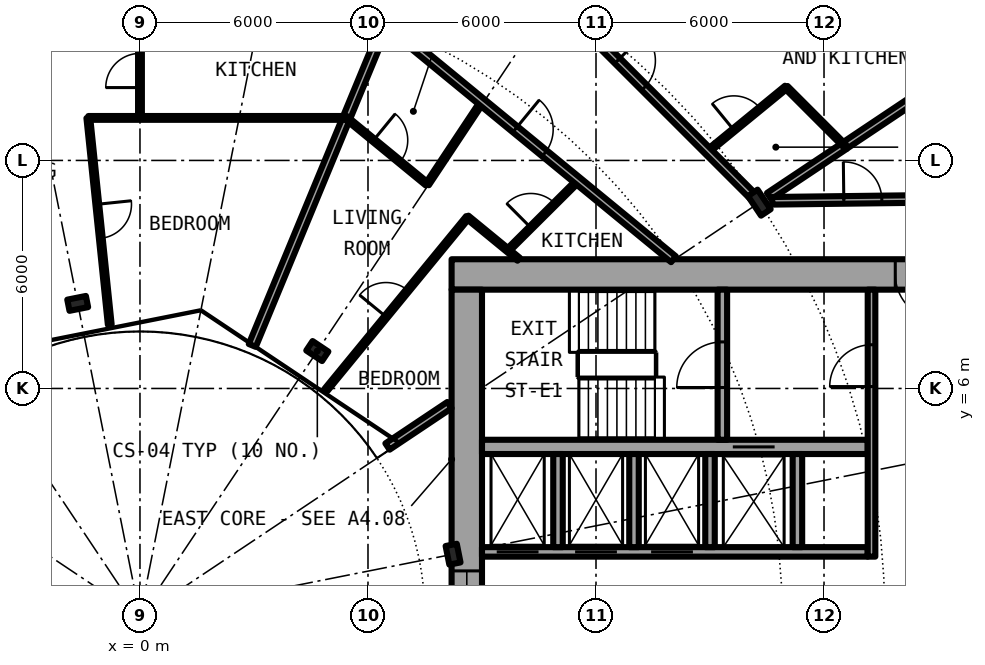
"""IFC4 building model, lengths in metres.
Left out: names, types, materials, properties, quantities, classifications, styles, units other than length and angle.
Written with IfcOpenShell. Run it as: python <this file> out.ifc"""

import sys

from ifc_helpers import new_model, si_unit, direction, frame, frame_2d, origin, origin_2d, place, context, subcontext, project, spatial, rectangle, i_section, extrude, element, fill, save


model = new_model("IFC4")
c1 = context("Model", 3, precision=1e-05, world=origin(), true_north=direction((0.0, 1.0)))
c2 = subcontext(c1, "Body", "Model", "MODEL_VIEW")
j1 = project(units=[si_unit("LENGTHUNIT", "METRE"), si_unit("PLANEANGLEUNIT", "RADIAN")], contexts=[c1])
p1 = place(None, origin())
s1 = spatial("IfcSite", under=j1, at=p1, CompositionType="ELEMENT")
p2 = place(p1, origin())
s2 = spatial("IfcBuilding", under=s1, at=p2, CompositionType="ELEMENT")
p3 = place(p2, frame((0.0, 0.0, 35.0)))
s3 = spatial("IfcBuildingStorey", under=s2, at=p3, CompositionType="ELEMENT", Elevation=35.0)
p4 = place(p3, frame((16.297, 10.889, 0.0), z_axis=(0.0, 0.0, 1.0), x_axis=(0.831469612303, 0.55557023302, 0.0)))
e1 = element("IfcColumn", 1, at=p4, inside=s3, PredefinedType="COLUMN", context=c2, shape_type="SweptSolid", body=[
    extrude(i_section(OverallWidth=0.305, OverallDepth=0.62, WebThickness=0.021, FlangeThickness=0.04, FilletRadius=0.027, at=origin_2d()), origin(), (0.0, 0.0, 1.0), 3.05),
])
for number, where, z_axis, x_axis in (
    (2, (8.239, 1.639, 0.0), (0.0, 0.0, 1.0), (0.981, 0.195, 0.0)),
    (3, (4.667, 6.984, 0.0), (0.0, 0.0, 1.0), (0.556, 0.831, 0.0)),
    (4, (-1.639, 8.239, 0.0), (0.0, 0.0, 1.0), (-0.195, 0.981, 0.0)),
):
    element("IfcColumn", number, at=place(p3, frame(where, z_axis=z_axis, x_axis=x_axis)), inside=s3, PredefinedType="COLUMN", context=c2, shape_type="SweptSolid", body=[
        extrude(i_section(OverallWidth=0.3, OverallDepth=0.5, WebThickness=0.014, FlangeThickness=0.028, FilletRadius=0.027, at=origin_2d()), origin(), (0.0, 0.0, 1.0), 3.05),
    ])
p5 = place(p3, frame((22.4, 9.0, 0.0), z_axis=(0.0, 0.0, 1.0), x_axis=(-1.0, 0.0, 0.0)))
e5 = element("IfcWall", 5, at=p5, inside=s3, PredefinedType="SHEAR", context=c2, shape_type="SweptSolid", body=[
    extrude(rectangle(XDim=14.2, YDim=0.8, at=frame_2d((7.1, 0.0))), origin(), (0.0, 0.0, 1.0), 3.05),
])
p6 = place(p5, frame((1.325, 0.0, 0.0)))
e6 = element("IfcOpeningElement", 6, at=p6, cuts=e5, PredefinedType="OPENING", context=c2, shape_type="SweptSolid", body=[
    extrude(rectangle(XDim=1.2, YDim=2.3, at=frame_2d((0.6, 1.15))), frame((0.0, 0.41, 0.0), z_axis=(0.0, -1.0, 0.0), x_axis=(1.0, 0.0, 0.0)), (0.0, 0.0, 1.0), 0.82),
])
p7 = place(p3, frame((8.6, -8.6, 0.0), z_axis=(0.0, 0.0, 1.0), x_axis=(0.0, 1.0, 0.0)))
e7 = element("IfcWall", 7, at=p7, inside=s3, PredefinedType="SHEAR", context=c2, shape_type="SweptSolid", body=[
    extrude(rectangle(XDim=17.2, YDim=0.8, at=frame_2d((8.6, 0.0))), origin(), (0.0, 0.0, 1.0), 3.05),
])
p8 = place(p7, frame((7.4, 0.0, 0.1)))
e8 = element("IfcOpeningElement", 8, at=p8, cuts=e7, PredefinedType="OPENING", context=c2, shape_type="SweptSolid", body=[
    extrude(rectangle(XDim=2.4, YDim=2.2, at=frame_2d((1.2, 1.1))), frame((0.0, 0.41, 0.0), z_axis=(0.0, -1.0, 0.0), x_axis=(1.0, 0.0, 0.0)), (0.0, 0.0, 1.0), 0.82),
])
p9 = place(p3, frame((9.0, 1.7, 0.0), z_axis=(0.0, 0.0, 1.0), x_axis=(1.0, 0.0, 0.0)))
e9 = element("IfcWall", 9, at=p9, inside=s3, PredefinedType="SHEAR", context=c2, shape_type="SweptSolid", body=[
    extrude(rectangle(XDim=10.15, YDim=0.25, at=frame_2d((5.075, 0.0))), origin(), (0.0, 0.0, 1.0), 3.05),
])
p10 = place(p9, frame((0.387, 0.0, 0.0)))
e10 = element("IfcOpeningElement", 10, at=p10, cuts=e9, PredefinedType="OPENING", context=c2, shape_type="SweptSolid", body=[
    extrude(rectangle(XDim=1.1, YDim=2.3, at=frame_2d((0.55, 1.15))), frame((0.0, 0.135, 0.0), z_axis=(0.0, -1.0, 0.0), x_axis=(1.0, 0.0, 0.0)), (0.0, 0.0, 1.0), 0.27),
])
p11 = place(p9, frame((2.45, 0.0, 0.0)))
e11 = element("IfcOpeningElement", 11, at=p11, cuts=e9, PredefinedType="OPENING", context=c2, shape_type="SweptSolid", body=[
    extrude(rectangle(XDim=1.1, YDim=2.3, at=frame_2d((0.55, 1.15))), frame((0.0, 0.135, 0.0), z_axis=(0.0, -1.0, 0.0), x_axis=(1.0, 0.0, 0.0)), (0.0, 0.0, 1.0), 0.27),
])
p12 = place(p9, frame((4.45, 0.0, 0.0)))
e12 = element("IfcOpeningElement", 12, at=p12, cuts=e9, PredefinedType="OPENING", context=c2, shape_type="SweptSolid", body=[
    extrude(rectangle(XDim=1.1, YDim=2.3, at=frame_2d((0.55, 1.15))), frame((0.0, 0.135, 0.0), z_axis=(0.0, -1.0, 0.0), x_axis=(1.0, 0.0, 0.0)), (0.0, 0.0, 1.0), 0.27),
])
p13 = place(p3, frame((9.0, 4.462, 0.0), z_axis=(0.0, 0.0, 1.0), x_axis=(1.0, 0.0, 0.0)))
e13 = element("IfcWall", 13, at=p13, inside=s3, PredefinedType="SHEAR", context=c2, shape_type="SweptSolid", body=[
    extrude(rectangle(XDim=10.15, YDim=0.375, at=frame_2d((5.075, 0.0))), origin(), (0.0, 0.0, 1.0), 3.05),
])
p14 = place(p13, frame((6.6, 0.0, 0.0)))
e14 = element("IfcOpeningElement", 14, at=p14, cuts=e13, PredefinedType="OPENING", context=c2, shape_type="SweptSolid", body=[
    extrude(rectangle(XDim=1.1, YDim=2.3, at=frame_2d((0.55, 1.15))), frame((0.0, 0.198, 0.0), z_axis=(0.0, -1.0, 0.0), x_axis=(1.0, 0.0, 0.0)), (0.0, 0.0, 1.0), 0.395),
])
p15 = place(p3, frame((15.325, 4.65, 0.0), z_axis=(0.0, 0.0, 1.0), x_axis=(0.0, 1.0, 0.0)))
e15 = element("IfcWall", 15, at=p15, inside=s3, PredefinedType="SHEAR", context=c2, shape_type="SweptSolid", body=[
    extrude(rectangle(XDim=3.95, YDim=0.25, at=frame_2d((1.975, 0.0))), origin(), (0.0, 0.0, 1.0), 3.05),
])
p16 = place(p15, frame((1.375, 0.0, 0.0)))
e16 = element("IfcOpeningElement", 16, at=p16, cuts=e15, PredefinedType="OPENING", context=c2, shape_type="SweptSolid", body=[
    extrude(rectangle(XDim=1.2, YDim=2.3, at=frame_2d((0.6, 1.15))), frame((0.0, 0.135, 0.0), z_axis=(0.0, -1.0, 0.0), x_axis=(1.0, 0.0, 0.0)), (0.0, 0.0, 1.0), 0.27),
])
for number, where, z_axis, x_axis in (
    (17, (15.0, 1.825, 0.0), (0.0, 0.0, 1.0), (0.0, 1.0, 0.0)),
    (18, (17.3, 1.825, 0.0), (0.0, 0.0, 1.0), (0.0, 1.0, 0.0)),
):
    element("IfcWall", number, at=place(p3, frame(where, z_axis=z_axis, x_axis=x_axis)), inside=s3, PredefinedType="SOLIDWALL", context=c2, shape_type="SweptSolid", body=[
        extrude(rectangle(XDim=2.45, YDim=0.25, at=frame_2d((1.225, 0.0))), origin(), (0.0, 0.0, 1.0), 2.7),
    ])
p17 = place(p3, frame((19.25, 1.575, 0.0), z_axis=(0.0, 0.0, 1.0), x_axis=(0.0, 1.0, 0.0)))
e19 = element("IfcWall", 19, at=p17, inside=s3, PredefinedType="SOLIDWALL", context=c2, shape_type="SweptSolid", body=[
    extrude(rectangle(XDim=7.025, YDim=0.2, at=frame_2d((3.513, 0.0))), origin(), (0.0, 0.0, 1.0), 2.7),
])
p18 = place(p17, frame((4.475, 0.0, 0.0)))
e20 = element("IfcOpeningElement", 20, at=p18, cuts=e19, PredefinedType="OPENING", context=c2, shape_type="SweptSolid", body=[
    extrude(rectangle(XDim=1.1, YDim=2.3, at=frame_2d((0.55, 1.15))), frame((0.0, 0.11, 0.0), z_axis=(0.0, -1.0, 0.0), x_axis=(1.0, 0.0, 0.0)), (0.0, 0.0, 1.0), 0.22),
])
for number, where, z_axis, x_axis in (
    (21, (11.0, 1.825, 0.0), (0.0, 0.0, 1.0), (0.0, 1.0, 0.0)),
    (22, (13.0, 1.825, 0.0), (0.0, 0.0, 1.0), (0.0, 1.0, 0.0)),
):
    element("IfcWall", number, at=place(p3, frame(where, z_axis=z_axis, x_axis=x_axis)), inside=s3, PredefinedType="SOLIDWALL", context=c2, shape_type="SweptSolid", body=[
        extrude(rectangle(XDim=2.45, YDim=0.25, at=frame_2d((1.225, 0.0))), origin(), (0.0, 0.0, 1.0), 2.7),
    ])
p19 = place(p3, frame((-1.359, 13.119, 0.0), z_axis=(0.0, 0.0, 1.0), x_axis=(0.103118462411, -0.994669082012, 0.0)))
e23 = element("IfcWall", 23, at=p19, inside=s3, PredefinedType="PARTITIONING", context=c2, shape_type="SweptSolid", body=[
    extrude(rectangle(XDim=5.469, YDim=0.1, at=frame_2d((2.734, 0.0))), origin(), (0.0, 0.0, 1.0), 2.7),
])
p20 = place(p19, frame((2.285, 0.0, 0.0)))
e24 = element("IfcOpeningElement", 24, at=p20, cuts=e23, PredefinedType="OPENING", context=c2, shape_type="SweptSolid", body=[
    extrude(rectangle(XDim=0.9, YDim=2.3, at=frame_2d((0.45, 1.15))), frame((0.0, 0.06, 0.0), z_axis=(0.0, -1.0, 0.0), x_axis=(1.0, 0.0, 0.0)), (0.0, 0.0, 1.0), 0.12),
])
p21 = place(p3, frame((0.0, 13.119, 0.0), z_axis=(0.0, 0.0, 1.0), x_axis=(0.0, 1.0, 0.0)))
e25 = element("IfcWall", 25, at=p21, inside=s3, PredefinedType="PARTITIONING", context=c2, shape_type="SweptSolid", body=[
    extrude(rectangle(XDim=2.495, YDim=0.1, at=frame_2d((1.248, 0.0))), origin(), (0.0, 0.0, 1.0), 2.7),
])
p22 = place(p21, frame((0.798, 0.0, 0.0)))
e26 = element("IfcOpeningElement", 26, at=p22, cuts=e25, PredefinedType="OPENING", context=c2, shape_type="SweptSolid", body=[
    extrude(rectangle(XDim=0.9, YDim=2.3, at=frame_2d((0.45, 1.15))), frame((0.0, 0.06, 0.0), z_axis=(0.0, -1.0, 0.0), x_axis=(1.0, 0.0, 0.0)), (0.0, 0.0, 1.0), 0.12),
])
p23 = place(p3, frame((2.955, 7.132, 0.0), z_axis=(0.0, 0.0, 1.0), x_axis=(0.382556139466, 0.923932248683, 0.0)))
e27 = element("IfcWall", 27, at=p23, inside=s3, PredefinedType="PARTITIONING", context=c2, shape_type="SweptSolid", body=[
    extrude(rectangle(XDim=9.18, YDim=0.2, at=frame_2d((4.59, 0.0))), origin(), (0.0, 0.0, 1.0), 2.7),
])
p24 = place(p3, frame((4.899, 5.967, 0.0), z_axis=(0.0, 0.0, 1.0), x_axis=(0.634358693064, 0.773038840249, 0.0)))
e28 = element("IfcWall", 28, at=p24, inside=s3, PredefinedType="PARTITIONING", context=c2, shape_type="SweptSolid", body=[
    extrude(rectangle(XDim=5.868, YDim=0.1, at=frame_2d((2.934, 0.0))), origin(), (0.0, 0.0, 1.0), 2.7),
])
p25 = place(p24, frame((2.484, 0.0, 0.0)))
e29 = element("IfcOpeningElement", 29, at=p25, cuts=e28, PredefinedType="OPENING", context=c2, shape_type="SweptSolid", body=[
    extrude(rectangle(XDim=0.9, YDim=2.3, at=frame_2d((0.45, 1.15))), frame((0.0, 0.06, 0.0), z_axis=(0.0, -1.0, 0.0), x_axis=(1.0, 0.0, 0.0)), (0.0, 0.0, 1.0), 0.12),
])
p26 = place(p3, frame((7.56, 11.375, 0.0), z_axis=(0.0, 0.0, 1.0), x_axis=(0.553354377247, 0.83294593653, 0.0)))
e30 = element("IfcWall", 30, at=p26, inside=s3, PredefinedType="PARTITIONING", context=c2, shape_type="SweptSolid", body=[
    extrude(rectangle(XDim=2.597, YDim=0.1, at=frame_2d((1.298, 0.0))), origin(), (0.0, 0.0, 1.0), 2.7),
])
p27 = place(p3, frame((9.683, 9.632, 0.0), z_axis=(0.0, 0.0, 1.0), x_axis=(0.708796844581, 0.705412668665, 0.0)))
e31 = element("IfcWall", 31, at=p27, inside=s3, PredefinedType="PARTITIONING", context=c2, shape_type="SweptSolid", body=[
    extrude(rectangle(XDim=2.597, YDim=0.1, at=frame_2d((1.299, 0.0))), origin(), (0.0, 0.0, 1.0), 2.7),
])
p28 = place(p27, frame((0.849, 0.0, 0.0)))
e32 = element("IfcOpeningElement", 32, at=p28, cuts=e31, PredefinedType="OPENING", context=c2, shape_type="SweptSolid", body=[
    extrude(rectangle(XDim=0.9, YDim=2.3, at=frame_2d((0.45, 1.15))), frame((0.0, 0.06, 0.0), z_axis=(0.0, -1.0, 0.0), x_axis=(1.0, 0.0, 0.0)), (0.0, 0.0, 1.0), 0.12),
])
p29 = place(p3, frame((14.945, 12.241, 0.0), z_axis=(0.0, 0.0, 1.0), x_axis=(0.77367517848, 0.633582447834, 0.0)))
e33 = element("IfcWall", 33, at=p29, inside=s3, PredefinedType="PARTITIONING", context=c2, shape_type="SweptSolid", body=[
    extrude(rectangle(XDim=2.661, YDim=0.1, at=frame_2d((1.331, 0.0))), origin(), (0.0, 0.0, 1.0), 2.7),
])
p30 = place(p29, frame((0.881, 0.0, 0.0)))
e34 = element("IfcOpeningElement", 34, at=p30, cuts=e33, PredefinedType="OPENING", context=c2, shape_type="SweptSolid", body=[
    extrude(rectangle(XDim=0.9, YDim=2.3, at=frame_2d((0.45, 1.15))), frame((0.0, 0.06, 0.0), z_axis=(0.0, -1.0, 0.0), x_axis=(1.0, 0.0, 0.0)), (0.0, 0.0, 1.0), 0.12),
])
p31 = place(p3, frame((18.542, 12.389, 0.0), z_axis=(0.0, 0.0, 1.0), x_axis=(0.831387096605, 0.55569370664, 0.0)))
e35 = element("IfcWall", 35, at=p31, inside=s3, PredefinedType="PARTITIONING", context=c2, shape_type="SweptSolid", body=[
    extrude(rectangle(XDim=4.875, YDim=0.2, at=frame_2d((2.438, 0.0))), origin(), (0.0, 0.0, 1.0), 2.7),
])
p32 = place(p3, frame((16.555, 11.061, 0.0), z_axis=(0.0, 0.0, 1.0), x_axis=(0.832066006555, 0.554676627176, 0.0)))
e36 = element("IfcWall", 36, at=p32, inside=s3, PredefinedType="PARTITIONING", context=c2, shape_type="SweptSolid", body=[
    extrude(rectangle(XDim=2.39, YDim=0.2, at=frame_2d((1.195, 0.0))), origin(), (0.0, 0.0, 1.0), 2.7),
])
p33 = place(p3, frame((6.513, 4.472, 0.0), z_axis=(0.0, 0.0, 1.0), x_axis=(0.831417956244, 0.555647533996, 0.0)))
e37 = element("IfcWall", 37, at=p33, inside=s3, PredefinedType="PARTITIONING", context=c2, shape_type="SweptSolid", body=[
    extrude(rectangle(XDim=1.962, YDim=0.2, at=frame_2d((0.981, 0.0))), origin(), (0.0, 0.0, 1.0), 2.7),
])
p34 = place(p3, frame((16.637, 10.938, 0.0), z_axis=(0.0, 0.0, 1.0), x_axis=(0.99992425795, 0.012307654658, 0.0)))
e38 = element("IfcWall", 38, at=p34, inside=s3, PredefinedType="PARTITIONING", context=c2, shape_type="SweptSolid", body=[
    extrude(rectangle(XDim=5.039, YDim=0.2, at=frame_2d((2.519, 0.0))), origin(), (0.0, 0.0, 1.0), 2.7),
])
p35 = place(p34, frame((1.884, 0.0, 0.0)))
e39 = element("IfcOpeningElement", 39, at=p35, cuts=e38, PredefinedType="OPENING", context=c2, shape_type="SweptSolid", body=[
    extrude(rectangle(XDim=1.0, YDim=2.3, at=frame_2d((0.5, 1.15))), frame((0.0, 0.11, 0.0), z_axis=(0.0, -1.0, 0.0), x_axis=(1.0, 0.0, 0.0)), (0.0, 0.0, 1.0), 0.22),
])
p36 = place(p3, frame((-1.359, 13.119, 0.0), z_axis=(0.0, 0.0, 1.0), x_axis=(1.0, 0.0, 0.0)))
e40 = element("IfcWall", 40, at=p36, inside=s3, PredefinedType="PARTITIONING", context=c2, shape_type="SweptSolid", body=[
    extrude(rectangle(XDim=6.793, YDim=0.1, at=frame_2d((3.396, 0.0))), origin(), (0.0, 0.0, 1.0), 2.7),
])
p37 = place(p3, frame((5.427, 13.121, 0.0), z_axis=(0.0, 0.0, 1.0), x_axis=(0.773323547924, -0.634011585246, 0.0)))
e41 = element("IfcWall", 41, at=p37, inside=s3, PredefinedType="PARTITIONING", context=c2, shape_type="SweptSolid", body=[
    extrude(rectangle(XDim=2.748, YDim=0.1, at=frame_2d((1.374, 0.0))), origin(), (0.0, 0.0, 1.0), 2.7),
])
p38 = place(p37, frame((0.93, 0.0, 0.0)))
e42 = element("IfcOpeningElement", 42, at=p38, cuts=e41, PredefinedType="OPENING", context=c2, shape_type="SweptSolid", body=[
    extrude(rectangle(XDim=0.9, YDim=2.3, at=frame_2d((0.45, 1.15))), frame((0.0, 0.06, 0.0), z_axis=(0.0, -1.0, 0.0), x_axis=(1.0, 0.0, 0.0)), (0.0, 0.0, 1.0), 0.12),
])
p39 = place(p3, frame((8.613, 10.509, 0.0), z_axis=(0.0, 0.0, 1.0), x_axis=(0.773141825369, -0.634233173104, 0.0)))
e43 = element("IfcWall", 43, at=p39, inside=s3, PredefinedType="PARTITIONING", context=c2, shape_type="SweptSolid", body=[
    extrude(rectangle(XDim=1.749, YDim=0.1, at=frame_2d((0.875, 0.0))), origin(), (0.0, 0.0, 1.0), 2.7),
])
p40 = place(p3, frame((6.469, 15.613, 0.0), z_axis=(0.0, 0.0, 1.0), x_axis=(0.77298340166, -0.634426245326, 0.0)))
e44 = element("IfcWall", 44, at=p40, inside=s3, PredefinedType="PARTITIONING", context=c2, shape_type="SweptSolid", body=[
    extrude(rectangle(XDim=9.793, YDim=0.2, at=frame_2d((4.896, 0.0))), origin(), (0.0, 0.0, 1.0), 2.7),
])
p41 = place(p40, frame((4.404, 0.0, 0.0)))
e45 = element("IfcOpeningElement", 45, at=p41, cuts=e44, PredefinedType="OPENING", context=c2, shape_type="SweptSolid", body=[
    extrude(rectangle(XDim=1.0, YDim=2.3, at=frame_2d((0.5, 1.15))), frame((0.0, 0.11, 0.0), z_axis=(0.0, -1.0, 0.0), x_axis=(1.0, 0.0, 0.0)), (0.0, 0.0, 1.0), 0.22),
])
p42 = place(p3, frame((10.999, 16.187, 0.0), z_axis=(0.0, 0.0, 1.0), x_axis=(0.707106781187, -0.707106781187, 0.0)))
e46 = element("IfcWall", 46, at=p42, inside=s3, PredefinedType="PARTITIONING", context=c2, shape_type="SweptSolid", body=[
    extrude(rectangle(XDim=7.337, YDim=0.2, at=frame_2d((3.668, 0.0))), origin(), (0.0, 0.0, 1.0), 2.38),
])
p43 = place(p42, frame((2.212, 0.0, 0.0)))
e47 = element("IfcOpeningElement", 47, at=p43, cuts=e46, PredefinedType="OPENING", context=c2, shape_type="SweptSolid", body=[
    extrude(rectangle(XDim=1.0, YDim=2.3, at=frame_2d((0.5, 1.15))), frame((0.0, 0.11, 0.0), z_axis=(0.0, -1.0, 0.0), x_axis=(1.0, 0.0, 0.0)), (0.0, 0.0, 1.0), 0.22),
])
p44 = place(p3, frame((17.006, 13.924, 0.0), z_axis=(0.0, 0.0, 1.0), x_axis=(0.706826194425, -0.707387256653, 0.0)))
e48 = element("IfcWall", 48, at=p44, inside=s3, PredefinedType="PARTITIONING", context=c2, shape_type="SweptSolid", body=[
    extrude(rectangle(XDim=2.176, YDim=0.1, at=frame_2d((1.088, 0.0))), origin(), (0.0, 0.0, 1.0), 2.7),
])
p45 = place(p10, origin())
e49 = element("IfcDoor", 49, at=p45, inside=s3, OperationType="DOUBLE_DOOR_SLIDING", PredefinedType="DOOR", context=c2, shape_type="SweptSolid", body=[
    extrude(rectangle(XDim=1.1, YDim=2.3, at=frame_2d((0.55, 1.15))), frame((0.0, 0.025, 0.0), z_axis=(0.0, -1.0, 0.0), x_axis=(1.0, 0.0, 0.0)), (0.0, 0.0, 1.0), 0.05),
])
fill(e10, e49)
p46 = place(p11, origin())
e50 = element("IfcDoor", 50, at=p46, inside=s3, OperationType="DOUBLE_DOOR_SLIDING", PredefinedType="DOOR", context=c2, shape_type="SweptSolid", body=[
    extrude(rectangle(XDim=1.1, YDim=2.3, at=frame_2d((0.55, 1.15))), frame((0.0, 0.025, 0.0), z_axis=(0.0, -1.0, 0.0), x_axis=(1.0, 0.0, 0.0)), (0.0, 0.0, 1.0), 0.05),
])
fill(e11, e50)
p47 = place(p12, origin())
e51 = element("IfcDoor", 51, at=p47, inside=s3, OperationType="DOUBLE_DOOR_SLIDING", PredefinedType="DOOR", context=c2, shape_type="SweptSolid", body=[
    extrude(rectangle(XDim=1.1, YDim=2.3, at=frame_2d((0.55, 1.15))), frame((0.0, 0.025, 0.0), z_axis=(0.0, -1.0, 0.0), x_axis=(1.0, 0.0, 0.0)), (0.0, 0.0, 1.0), 0.05),
])
fill(e12, e51)
p48 = place(p14, origin())
e52 = element("IfcDoor", 52, at=p48, inside=s3, OperationType="DOUBLE_DOOR_SLIDING", PredefinedType="DOOR", context=c2, shape_type="SweptSolid", body=[
    extrude(rectangle(XDim=1.1, YDim=2.3, at=frame_2d((0.55, 1.15))), frame((0.0, 0.025, 0.0), z_axis=(0.0, -1.0, 0.0), x_axis=(1.0, 0.0, 0.0)), (0.0, 0.0, 1.0), 0.05),
])
fill(e14, e52)
p49 = place(p16, origin())
e53 = element("IfcDoor", 53, at=p49, inside=s3, OperationType="SINGLE_SWING_LEFT", PredefinedType="DOOR", context=c2, shape_type="SweptSolid", body=[
    extrude(rectangle(XDim=1.2, YDim=2.3, at=frame_2d((0.6, 1.15))), frame((0.0, 0.025, 0.0), z_axis=(0.0, -1.0, 0.0), x_axis=(1.0, 0.0, 0.0)), (0.0, 0.0, 1.0), 0.05),
])
fill(e16, e53)
p50 = place(p18, origin())
e54 = element("IfcDoor", 54, at=p50, inside=s3, OperationType="SINGLE_SWING_LEFT", PredefinedType="DOOR", context=c2, shape_type="SweptSolid", body=[
    extrude(rectangle(XDim=1.1, YDim=2.3, at=frame_2d((0.55, 1.15))), frame((0.0, 0.025, 0.0), z_axis=(0.0, -1.0, 0.0), x_axis=(1.0, 0.0, 0.0)), (0.0, 0.0, 1.0), 0.05),
])
fill(e20, e54)
p51 = place(p6, origin())
e55 = element("IfcDoor", 55, at=p51, inside=s3, OperationType="SINGLE_SWING_RIGHT", PredefinedType="DOOR", context=c2, shape_type="SweptSolid", body=[
    extrude(rectangle(XDim=1.2, YDim=2.3, at=frame_2d((0.6, 1.15))), frame((0.0, 0.025, 0.0), z_axis=(0.0, -1.0, 0.0), x_axis=(1.0, 0.0, 0.0)), (0.0, 0.0, 1.0), 0.05),
])
fill(e6, e55)
p52 = place(p8, origin())
e56 = element("IfcWindow", 56, at=p52, inside=s3, PartitioningType="SINGLE_PANEL", PredefinedType="WINDOW", context=c2, shape_type="SweptSolid", body=[
    extrude(rectangle(XDim=2.4, YDim=2.2, at=frame_2d((1.2, 1.1))), frame((0.0, 0.03, 0.0), z_axis=(0.0, -1.0, 0.0), x_axis=(1.0, 0.0, 0.0)), (0.0, 0.0, 1.0), 0.06),
])
fill(e8, e56)
p53 = place(p43, origin())
e57 = element("IfcDoor", 57, at=p53, inside=s3, OperationType="SINGLE_SWING_LEFT", PredefinedType="DOOR", context=c2, shape_type="SweptSolid", body=[
    extrude(rectangle(XDim=1.0, YDim=2.3, at=frame_2d((0.5, 1.15))), frame((0.0, 0.025, 0.0), z_axis=(0.0, -1.0, 0.0), x_axis=(1.0, 0.0, 0.0)), (0.0, 0.0, 1.0), 0.05),
])
fill(e47, e57)
p54 = place(p30, origin())
e58 = element("IfcDoor", 58, at=p54, inside=s3, OperationType="SINGLE_SWING_LEFT", PredefinedType="DOOR", context=c2, shape_type="SweptSolid", body=[
    extrude(rectangle(XDim=0.9, YDim=2.3, at=frame_2d((0.45, 1.15))), frame((0.0, 0.025, 0.0), z_axis=(0.0, -1.0, 0.0), x_axis=(1.0, 0.0, 0.0)), (0.0, 0.0, 1.0), 0.05),
])
fill(e34, e58)
p55 = place(p41, origin())
e59 = element("IfcDoor", 59, at=p55, inside=s3, OperationType="SINGLE_SWING_RIGHT", PredefinedType="DOOR", context=c2, shape_type="SweptSolid", body=[
    extrude(rectangle(XDim=1.0, YDim=2.3, at=frame_2d((0.5, 1.15))), frame((0.0, 0.025, 0.0), z_axis=(0.0, -1.0, 0.0), x_axis=(1.0, 0.0, 0.0)), (0.0, 0.0, 1.0), 0.05),
])
fill(e45, e59)
p56 = place(p38, origin())
e60 = element("IfcDoor", 60, at=p56, inside=s3, OperationType="SINGLE_SWING_RIGHT", PredefinedType="DOOR", context=c2, shape_type="SweptSolid", body=[
    extrude(rectangle(XDim=0.9, YDim=2.3, at=frame_2d((0.45, 1.15))), frame((0.0, 0.025, 0.0), z_axis=(0.0, -1.0, 0.0), x_axis=(1.0, 0.0, 0.0)), (0.0, 0.0, 1.0), 0.05),
])
fill(e42, e60)
p57 = place(p28, origin())
e61 = element("IfcDoor", 61, at=p57, inside=s3, OperationType="SINGLE_SWING_LEFT", PredefinedType="DOOR", context=c2, shape_type="SweptSolid", body=[
    extrude(rectangle(XDim=0.9, YDim=2.3, at=frame_2d((0.45, 1.15))), frame((0.0, 0.025, 0.0), z_axis=(0.0, -1.0, 0.0), x_axis=(1.0, 0.0, 0.0)), (0.0, 0.0, 1.0), 0.05),
])
fill(e32, e61)
p58 = place(p25, origin())
e62 = element("IfcDoor", 62, at=p58, inside=s3, OperationType="SINGLE_SWING_RIGHT", PredefinedType="DOOR", context=c2, shape_type="SweptSolid", body=[
    extrude(rectangle(XDim=0.9, YDim=2.3, at=frame_2d((0.45, 1.15))), frame((0.0, 0.025, 0.0), z_axis=(0.0, -1.0, 0.0), x_axis=(1.0, 0.0, 0.0)), (0.0, 0.0, 1.0), 0.05),
])
fill(e29, e62)
p59 = place(p22, origin())
e63 = element("IfcDoor", 63, at=p59, inside=s3, OperationType="SINGLE_SWING_RIGHT", PredefinedType="DOOR", context=c2, shape_type="SweptSolid", body=[
    extrude(rectangle(XDim=0.9, YDim=2.3, at=frame_2d((0.45, 1.15))), frame((0.0, 0.025, 0.0), z_axis=(0.0, -1.0, 0.0), x_axis=(1.0, 0.0, 0.0)), (0.0, 0.0, 1.0), 0.05),
])
fill(e26, e63)
p60 = place(p20, origin())
e64 = element("IfcDoor", 64, at=p60, inside=s3, OperationType="SINGLE_SWING_RIGHT", PredefinedType="DOOR", context=c2, shape_type="SweptSolid", body=[
    extrude(rectangle(XDim=0.9, YDim=2.3, at=frame_2d((0.45, 1.15))), frame((0.0, 0.025, 0.0), z_axis=(0.0, -1.0, 0.0), x_axis=(1.0, 0.0, 0.0)), (0.0, 0.0, 1.0), 0.05),
])
fill(e24, e64)
p61 = place(p35, origin())
e65 = element("IfcDoor", 65, at=p61, inside=s3, OperationType="SINGLE_SWING_LEFT", PredefinedType="DOOR", context=c2, shape_type="SweptSolid", body=[
    extrude(rectangle(XDim=1.0, YDim=2.3, at=frame_2d((0.5, 1.15))), frame((0.0, 0.025, 0.0), z_axis=(0.0, -1.0, 0.0), x_axis=(1.0, 0.0, 0.0)), (0.0, 0.0, 1.0), 0.05),
])
fill(e39, e65)
save(model, sys.argv[1])
